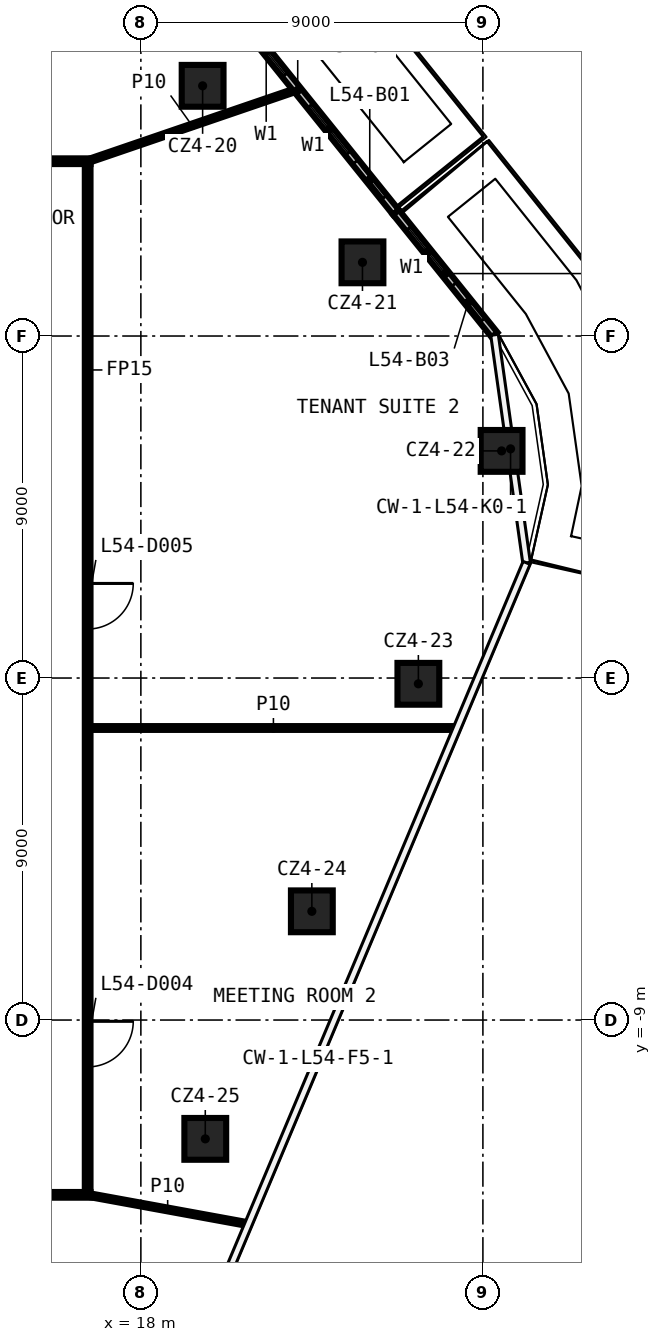
"""IFC4 building model, lengths in metres.
Left out: names, types, materials, properties, quantities, classifications, styles, units other than length and angle.
Written with IfcOpenShell. Run it as: python <this file> out.ifc"""

import sys

from ifc_helpers import new_model, si_unit, direction, frame, frame_2d, origin, origin_2d, place, context, subcontext, project, spatial, rectangle, extrude, element, fill, save


model = new_model("IFC4")
c1 = context("Model", 3, precision=1e-05, world=origin(), true_north=direction((0.0, 1.0)))
c2 = subcontext(c1, "Body", "Model", "MODEL_VIEW")
j1 = project(units=[si_unit("LENGTHUNIT", "METRE"), si_unit("PLANEANGLEUNIT", "RADIAN")], contexts=[c1])
p1 = place(None, origin())
s1 = spatial("IfcSite", under=j1, at=p1, CompositionType="ELEMENT")
p2 = place(p1, origin())
s2 = spatial("IfcBuilding", under=s1, at=p2, CompositionType="ELEMENT")
p3 = place(p2, frame((0.0, 0.0, 258.0)))
s3 = spatial("IfcBuildingStorey", under=s2, at=p3, CompositionType="ELEMENT", Elevation=258.0)
for number, where, z_axis, x_axis in (
    (1, (19.625, 15.584, 0.0), (0.0, 0.0, 1.0), (1.0, 0.0, 0.0)),
    (2, (23.831, 10.939, 0.0), (0.0, 0.0, 1.0), (1.0, 0.0, 0.0)),
    (3, (27.492, 5.977, 0.0), (0.0, 0.0, 1.0), (1.0, 0.0, 0.0)),
    (4, (25.302, -0.152, 0.0), (0.0, 0.0, 1.0), (1.0, 0.0, 0.0)),
    (5, (22.499, -6.139, 0.0), (0.0, 0.0, 1.0), (1.0, 0.0, 0.0)),
    (6, (19.695, -12.127, 0.0), (0.0, 0.0, 1.0), (1.0, 0.0, 0.0)),
):
    element("IfcColumn", number, at=place(p3, frame(where, z_axis=z_axis, x_axis=x_axis)), inside=s3, PredefinedType="COLUMN", context=c2, shape_type="SweptSolid", body=[
        extrude(rectangle(XDim=1.1, YDim=1.1, at=origin_2d()), origin(), (0.0, 0.0, 1.0), 3.82),
    ])
p4 = place(p3, frame((16.675, -13.6, 0.0), z_axis=(0.0, 0.0, 1.0), x_axis=(-1.0, 0.0, 0.0)))
e7 = element("IfcWall", 7, at=p4, inside=s3, PredefinedType="PARTITIONING", context=c2, shape_type="SweptSolid", body=[
    extrude(rectangle(XDim=32.75, YDim=0.15, at=frame_2d((16.375, 0.0))), origin(), (0.0, 0.0, 1.0), 3.82),
])
p5 = place(p4, frame((29.587, 0.0, 0.0)))
e8 = element("IfcOpeningElement", 8, at=p5, cuts=e7, PredefinedType="OPENING", context=c2, shape_type="SweptSolid", body=[
    extrude(rectangle(XDim=1.2, YDim=2.1, at=frame_2d((0.6, 1.05))), frame((0.0, 0.085, 0.0), z_axis=(0.0, -1.0, 0.0), x_axis=(1.0, 0.0, 0.0)), (0.0, 0.0, 1.0), 0.17),
])
p6 = place(p4, frame((17.04, 0.0, 0.0)))
e9 = element("IfcOpeningElement", 9, at=p6, cuts=e7, PredefinedType="OPENING", context=c2, shape_type="SweptSolid", body=[
    extrude(rectangle(XDim=1.2, YDim=2.1, at=frame_2d((0.6, 1.05))), frame((0.0, 0.085, 0.0), z_axis=(0.0, -1.0, 0.0), x_axis=(1.0, 0.0, 0.0)), (0.0, 0.0, 1.0), 0.17),
])
p7 = place(p4, frame((2.495, 0.0, 0.0)))
e10 = element("IfcOpeningElement", 10, at=p7, cuts=e7, PredefinedType="OPENING", context=c2, shape_type="SweptSolid", body=[
    extrude(rectangle(XDim=1.2, YDim=2.1, at=frame_2d((0.6, 1.05))), frame((0.0, 0.085, 0.0), z_axis=(0.0, -1.0, 0.0), x_axis=(1.0, 0.0, 0.0)), (0.0, 0.0, 1.0), 0.17),
])
p8 = place(p3, frame((16.675, -1.315, 0.0), z_axis=(0.0, 0.0, 1.0), x_axis=(1.0, 0.0, 0.0)))
e11 = element("IfcWall", 11, at=p8, inside=s3, PredefinedType="PARTITIONING", context=c2, shape_type="SweptSolid", body=[
    extrude(rectangle(XDim=9.626, YDim=0.1, at=frame_2d((4.813, 0.0))), origin(), (0.0, 0.0, 1.0), 3.82),
])
p9 = place(p3, frame((-16.075, 13.6, 0.0), z_axis=(0.0, 0.0, 1.0), x_axis=(1.0, 0.0, 0.0)))
e12 = element("IfcWall", 12, at=p9, inside=s3, PredefinedType="PARTITIONING", context=c2, shape_type="SweptSolid", body=[
    extrude(rectangle(XDim=32.75, YDim=0.15, at=frame_2d((16.375, 0.0))), origin(), (0.0, 0.0, 1.0), 3.82),
])
p10 = place(p9, frame((16.43, 0.0, 0.0)))
e13 = element("IfcOpeningElement", 13, at=p10, cuts=e12, PredefinedType="OPENING", context=c2, shape_type="SweptSolid", body=[
    extrude(rectangle(XDim=1.2, YDim=2.1, at=frame_2d((0.6, 1.05))), frame((0.0, 0.085, 0.0), z_axis=(0.0, -1.0, 0.0), x_axis=(1.0, 0.0, 0.0)), (0.0, 0.0, 1.0), 0.17),
])
p11 = place(p9, frame((4.465, 0.0, 0.0)))
e14 = element("IfcOpeningElement", 14, at=p11, cuts=e12, PredefinedType="OPENING", context=c2, shape_type="SweptSolid", body=[
    extrude(rectangle(XDim=1.2, YDim=2.1, at=frame_2d((0.6, 1.05))), frame((0.0, 0.085, 0.0), z_axis=(0.0, -1.0, 0.0), x_axis=(1.0, 0.0, 0.0)), (0.0, 0.0, 1.0), 0.17),
])
p12 = place(p3, frame((16.6, 13.6, 0.0), z_axis=(0.0, 0.0, 1.0), x_axis=(0.946142628781, 0.323750098073, 0.0)))
e15 = element("IfcWall", 15, at=p12, inside=s3, PredefinedType="PARTITIONING", context=c2, shape_type="SweptSolid", body=[
    extrude(rectangle(XDim=5.805, YDim=0.1, at=frame_2d((2.903, 0.0))), origin(), (0.0, 0.0, 1.0), 3.82),
])
p13 = place(p3, frame((16.6, 13.525, 0.0), z_axis=(0.0, 0.0, 1.0), x_axis=(0.0, -1.0, 0.0)))
e16 = element("IfcWall", 16, at=p13, inside=s3, PredefinedType="PARTITIONING", context=c2, shape_type="SweptSolid", body=[
    extrude(rectangle(XDim=27.05, YDim=0.15, at=frame_2d((13.525, 0.0))), origin(), (0.0, 0.0, 1.0), 3.82),
])
p14 = place(p13, frame((22.559, 0.0, 0.0)))
e17 = element("IfcOpeningElement", 17, at=p14, cuts=e16, PredefinedType="OPENING", context=c2, shape_type="SweptSolid", body=[
    extrude(rectangle(XDim=1.2, YDim=2.1, at=frame_2d((0.6, 1.05))), frame((0.0, 0.085, 0.0), z_axis=(0.0, -1.0, 0.0), x_axis=(1.0, 0.0, 0.0)), (0.0, 0.0, 1.0), 0.17),
])
p15 = place(p13, frame((11.036, 0.0, 0.0)))
e18 = element("IfcOpeningElement", 18, at=p15, cuts=e16, PredefinedType="OPENING", context=c2, shape_type="SweptSolid", body=[
    extrude(rectangle(XDim=1.2, YDim=2.1, at=frame_2d((0.6, 1.05))), frame((0.0, 0.085, 0.0), z_axis=(0.0, -1.0, 0.0), x_axis=(1.0, 0.0, 0.0)), (0.0, 0.0, 1.0), 0.17),
])
p16 = place(p3, frame((16.6, -13.6, 0.0), z_axis=(0.0, 0.0, 1.0), x_axis=(0.983699688502, -0.179819139254, 0.0)))
e19 = element("IfcWall", 19, at=p16, inside=s3, PredefinedType="PARTITIONING", context=c2, shape_type="SweptSolid", body=[
    extrude(rectangle(XDim=4.28, YDim=0.1, at=frame_2d((2.14, 0.0))), origin(), (0.0, 0.0, 1.0), 3.82),
])
p17 = place(p3, frame((24.712, 12.255, 0.0), z_axis=(0.0, 0.0, 1.0), x_axis=(-0.626871708653, 0.77912249415, 0.0)))
e20 = element("IfcWall", 20, at=p17, inside=s3, PredefinedType="SOLIDWALL", context=c2, shape_type="SweptSolid", body=[
    extrude(rectangle(XDim=8.293, YDim=0.2, at=frame_2d((4.147, 0.0))), origin(), (0.0, 0.0, 1.0), 3.82),
])
p18 = place(p17, frame((2.0, 0.0, 0.6)))
e21 = element("IfcOpeningElement", 21, at=p18, cuts=e20, PredefinedType="OPENING", context=c2, shape_type="SweptSolid", body=[
    extrude(rectangle(XDim=1.6, YDim=2.4, at=frame_2d((0.8, 1.2))), frame((0.0, 0.11, 0.0), z_axis=(0.0, -1.0, 0.0), x_axis=(1.0, 0.0, 0.0)), (0.0, 0.0, 1.0), 0.22),
])
p19 = place(p17, frame((0.5, 0.0, 0.0)))
e22 = element("IfcOpeningElement", 22, at=p19, cuts=e20, PredefinedType="OPENING", context=c2, shape_type="SweptSolid", body=[
    extrude(rectangle(XDim=1.2, YDim=2.4, at=frame_2d((0.6, 1.2))), frame((0.0, 0.11, 0.0), z_axis=(0.0, -1.0, 0.0), x_axis=(1.0, 0.0, 0.0)), (0.0, 0.0, 1.0), 0.22),
])
p20 = place(p17, frame((4.647, 0.0, 0.6)))
e23 = element("IfcOpeningElement", 23, at=p20, cuts=e20, PredefinedType="OPENING", context=c2, shape_type="SweptSolid", body=[
    extrude(rectangle(XDim=1.6, YDim=2.4, at=frame_2d((0.8, 1.2))), frame((0.0, 0.11, 0.0), z_axis=(0.0, -1.0, 0.0), x_axis=(1.0, 0.0, 0.0)), (0.0, 0.0, 1.0), 0.22),
])
p21 = place(p17, frame((6.547, 0.0, 0.0)))
e24 = element("IfcOpeningElement", 24, at=p21, cuts=e20, PredefinedType="OPENING", context=c2, shape_type="SweptSolid", body=[
    extrude(rectangle(XDim=1.2, YDim=2.4, at=frame_2d((0.6, 1.2))), frame((0.0, 0.11, 0.0), z_axis=(0.0, -1.0, 0.0), x_axis=(1.0, 0.0, 0.0)), (0.0, 0.0, 1.0), 0.22),
])
p22 = place(p3, frame((27.306, 9.031, 0.0), z_axis=(0.0, 0.0, 1.0), x_axis=(-0.626851318776, 0.779138899137, 0.0)))
e25 = element("IfcWall", 25, at=p22, inside=s3, PredefinedType="SOLIDWALL", context=c2, shape_type="SweptSolid", body=[
    extrude(rectangle(XDim=4.138, YDim=0.2, at=frame_2d((2.069, 0.0))), origin(), (0.0, 0.0, 1.0), 3.82),
])
p23 = place(p22, frame((2.0, 0.0, 0.6)))
e26 = element("IfcOpeningElement", 26, at=p23, cuts=e25, PredefinedType="OPENING", context=c2, shape_type="SweptSolid", body=[
    extrude(rectangle(XDim=1.6, YDim=2.4, at=frame_2d((0.8, 1.2))), frame((0.0, 0.11, 0.0), z_axis=(0.0, -1.0, 0.0), x_axis=(1.0, 0.0, 0.0)), (0.0, 0.0, 1.0), 0.22),
])
p24 = place(p22, frame((0.5, 0.0, 0.0)))
e27 = element("IfcOpeningElement", 27, at=p24, cuts=e25, PredefinedType="OPENING", context=c2, shape_type="SweptSolid", body=[
    extrude(rectangle(XDim=1.2, YDim=2.4, at=frame_2d((0.6, 1.2))), frame((0.0, 0.11, 0.0), z_axis=(0.0, -1.0, 0.0), x_axis=(1.0, 0.0, 0.0)), (0.0, 0.0, 1.0), 0.22),
])
p25 = place(p14, origin())
e28 = element("IfcDoor", 28, at=p25, inside=s3, OperationType="SINGLE_SWING_LEFT", PredefinedType="DOOR", context=c2, shape_type="SweptSolid", body=[
    extrude(rectangle(XDim=1.2, YDim=2.1, at=frame_2d((0.6, 1.05))), frame((0.0, 0.025, 0.0), z_axis=(0.0, -1.0, 0.0), x_axis=(1.0, 0.0, 0.0)), (0.0, 0.0, 1.0), 0.05),
])
fill(e17, e28)
p26 = place(p15, origin())
e29 = element("IfcDoor", 29, at=p26, inside=s3, OperationType="SINGLE_SWING_RIGHT", PredefinedType="DOOR", context=c2, shape_type="SweptSolid", body=[
    extrude(rectangle(XDim=1.2, YDim=2.1, at=frame_2d((0.6, 1.05))), frame((0.0, 0.025, 0.0), z_axis=(0.0, -1.0, 0.0), x_axis=(1.0, 0.0, 0.0)), (0.0, 0.0, 1.0), 0.05),
])
fill(e18, e29)
p27 = place(p18, origin())
e30 = element("IfcWindow", 30, at=p27, inside=s3, PartitioningType="SINGLE_PANEL", PredefinedType="WINDOW", context=c2, shape_type="SweptSolid", body=[
    extrude(rectangle(XDim=1.6, YDim=2.4, at=frame_2d((0.8, 1.2))), frame((0.0, 0.03, 0.0), z_axis=(0.0, -1.0, 0.0), x_axis=(1.0, 0.0, 0.0)), (0.0, 0.0, 1.0), 0.06),
])
fill(e21, e30)
p28 = place(p19, origin())
e31 = element("IfcDoor", 31, at=p28, inside=s3, OperationType="SLIDING_TO_LEFT", PredefinedType="DOOR", context=c2, shape_type="SweptSolid", body=[
    extrude(rectangle(XDim=1.2, YDim=2.4, at=frame_2d((0.6, 1.2))), frame((0.0, 0.025, 0.0), z_axis=(0.0, -1.0, 0.0), x_axis=(1.0, 0.0, 0.0)), (0.0, 0.0, 1.0), 0.05),
])
fill(e22, e31)
p29 = place(p20, origin())
e32 = element("IfcWindow", 32, at=p29, inside=s3, PartitioningType="SINGLE_PANEL", PredefinedType="WINDOW", context=c2, shape_type="SweptSolid", body=[
    extrude(rectangle(XDim=1.6, YDim=2.4, at=frame_2d((0.8, 1.2))), frame((0.0, 0.03, 0.0), z_axis=(0.0, -1.0, 0.0), x_axis=(1.0, 0.0, 0.0)), (0.0, 0.0, 1.0), 0.06),
])
fill(e23, e32)
p30 = place(p23, origin())
e33 = element("IfcWindow", 33, at=p30, inside=s3, PartitioningType="SINGLE_PANEL", PredefinedType="WINDOW", context=c2, shape_type="SweptSolid", body=[
    extrude(rectangle(XDim=1.6, YDim=2.4, at=frame_2d((0.8, 1.2))), frame((0.0, 0.03, 0.0), z_axis=(0.0, -1.0, 0.0), x_axis=(1.0, 0.0, 0.0)), (0.0, 0.0, 1.0), 0.06),
])
fill(e26, e33)
p31 = place(p24, origin())
e34 = element("IfcDoor", 34, at=p31, inside=s3, OperationType="SLIDING_TO_LEFT", PredefinedType="DOOR", context=c2, shape_type="SweptSolid", body=[
    extrude(rectangle(XDim=1.2, YDim=2.4, at=frame_2d((0.6, 1.2))), frame((0.0, 0.025, 0.0), z_axis=(0.0, -1.0, 0.0), x_axis=(1.0, 0.0, 0.0)), (0.0, 0.0, 1.0), 0.05),
])
fill(e27, e34)
save(model, sys.argv[1])
